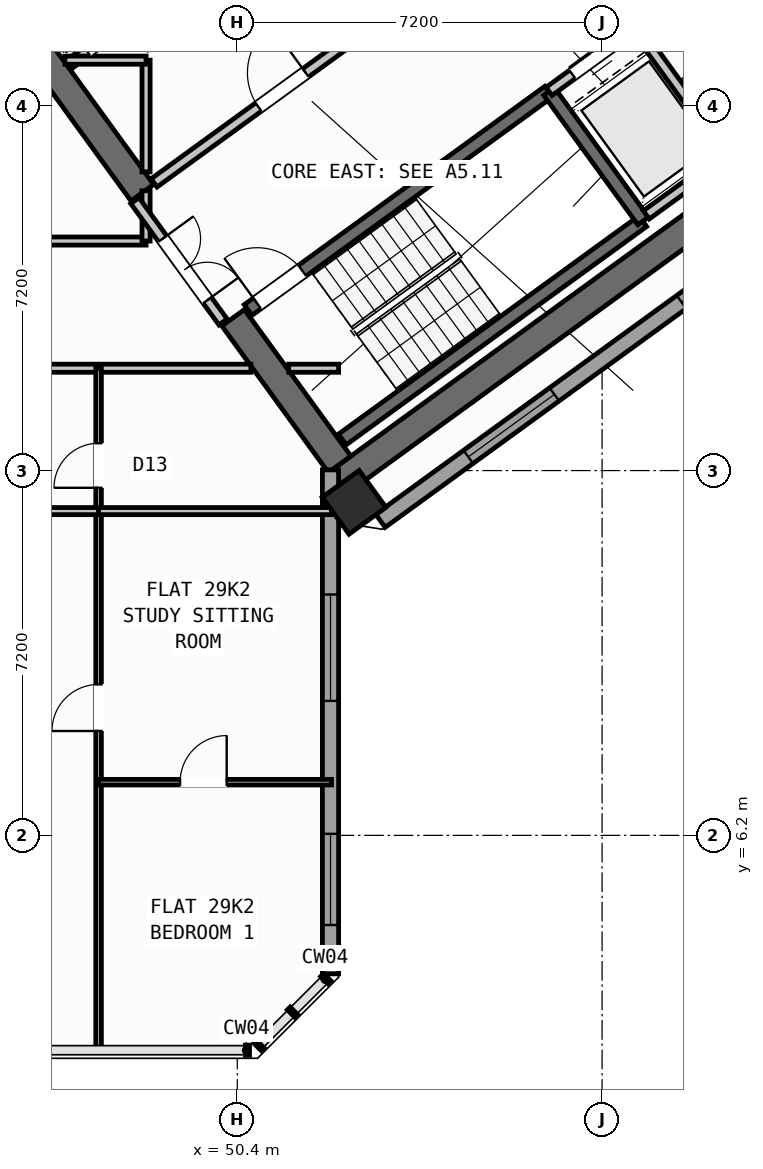
"""IFC4 building model, lengths in metres.
Left out: names, types, materials, properties, quantities, classifications, styles, units other than length and angle.
Written with IfcOpenShell. Run it as: python <this file> out.ifc"""

import sys

from ifc_helpers import new_model, si_unit, direction, frame, frame_2d, origin, origin_2d, place, context, subcontext, project, spatial, rectangle, hollow_rectangle, extrude, source, transform, mapped, element, fill, save


model = new_model("IFC4")
c1 = context("Model", 3, precision=1e-05, world=origin(), true_north=direction((0.0, 1.0)))
c2 = subcontext(c1, "Body", "Model", "MODEL_VIEW")
j1 = project(units=[si_unit("LENGTHUNIT", "METRE"), si_unit("PLANEANGLEUNIT", "RADIAN")], contexts=[c1])
p1 = place(None, origin())
s1 = spatial("IfcSite", under=j1, at=p1, CompositionType="ELEMENT")
p2 = place(p1, origin())
s2 = spatial("IfcBuilding", under=s1, at=p2, CompositionType="ELEMENT")
p3 = place(p2, frame((0.0, 0.0, 116.1)))
s3 = spatial("IfcBuildingStorey", under=s2, at=p3, CompositionType="ELEMENT", Elevation=116.1)
p4 = place(p3, frame((52.359, 13.14, 0.0), z_axis=(0.0, 0.0, 1.0), x_axis=(0.809014896919, 0.587788139183, 0.0)))
e1 = element("IfcWall", 1, at=p4, inside=s3, PredefinedType="SHEAR", context=c2, shape_type="SweptSolid", body=[
    extrude(rectangle(XDim=12.34, YDim=0.55, at=frame_2d((6.17, 0.0))), origin(), (0.0, 0.0, 1.0), 3.35),
])
p5 = place(p3, frame((52.42, 13.524, 0.0), z_axis=(0.0, 0.0, 1.0), x_axis=(-0.587802113096, 0.809004744015, 0.0)))
e2 = element("IfcWall", 2, at=p5, inside=s3, PredefinedType="SHEAR", context=c2, shape_type="SweptSolid", body=[
    extrude(rectangle(XDim=3.575, YDim=0.55, at=frame_2d((1.788, 0.0))), origin(), (0.0, 0.0, 1.0), 3.35),
])
p6 = place(p3, frame((48.526, 18.884, 0.0), z_axis=(0.0, 0.0, 1.0), x_axis=(-0.587764933797, 0.809031756236, 0.0)))
e3 = element("IfcWall", 3, at=p6, inside=s3, PredefinedType="SHEAR", context=c2, shape_type="SweptSolid", body=[
    extrude(rectangle(XDim=6.425, YDim=0.55, at=frame_2d((3.212, 0.0))), origin(), (0.0, 0.0, 1.0), 3.35),
])
m1 = source(origin(), c2, "Body", "SweptSolid", [
    extrude(hollow_rectangle(XDim=0.9, YDim=0.9, WallThickness=0.036, at=origin_2d()), origin(), (0.0, 0.0, 1.0), 3.6),
])
p7 = place(p3, frame((52.705, 12.773, 0.0), z_axis=(0.0, 0.0, 1.0), x_axis=(0.809016994375, 0.587785252292, 0.0)))
e4 = element("IfcColumn", 4, at=p7, inside=s3, PredefinedType="COLUMN", context=c2, shape_type="MappedRepresentation", body=[
    mapped(m1, transform((0.0, 0.0, 0.0), scale=1.0)),
])
p8 = place(p3, frame((67.454, 22.747, 0.0), z_axis=(0.0, 0.0, 1.0), x_axis=(-0.809021120468, -0.587779573171, 0.0)))
e5 = element("IfcWall", 5, at=p8, inside=s3, PredefinedType="STANDARD", context=c2, shape_type="SweptSolid", body=[
    extrude(rectangle(XDim=17.588, YDim=0.32, at=frame_2d((8.794, 0.0))), origin(), (0.0, 0.0, 1.0), 3.35),
])
p9 = place(p8, frame((1.624, 0.0, 0.0)))
e6 = element("IfcOpeningElement", 6, at=p9, cuts=e5, PredefinedType="OPENING", context=c2, shape_type="SweptSolid", body=[
    extrude(rectangle(XDim=1.05, YDim=2.15, at=frame_2d((0.525, 1.075))), frame((0.0, 0.17, 0.0), z_axis=(0.0, -1.0, 0.0), x_axis=(1.0, 0.0, 0.0)), (0.0, 0.0, 1.0), 0.34),
])
p10 = place(p8, frame((8.144, 0.0, 0.8)))
e7 = element("IfcOpeningElement", 7, at=p10, cuts=e5, PredefinedType="OPENING", context=c2, shape_type="SweptSolid", body=[
    extrude(rectangle(XDim=2.1, YDim=1.55, at=frame_2d((1.05, 0.775))), frame((0.0, 0.17, 0.0), z_axis=(0.0, -1.0, 0.0), x_axis=(1.0, 0.0, 0.0)), (0.0, 0.0, 1.0), 0.34),
])
p11 = place(p8, frame((13.344, 0.0, 0.8)))
e8 = element("IfcOpeningElement", 8, at=p11, cuts=e5, PredefinedType="OPENING", context=c2, shape_type="SweptSolid", body=[
    extrude(rectangle(XDim=2.1, YDim=1.55, at=frame_2d((1.05, 0.775))), frame((0.0, 0.17, 0.0), z_axis=(0.0, -1.0, 0.0), x_axis=(1.0, 0.0, 0.0)), (0.0, 0.0, 1.0), 0.34),
])
p12 = place(p3, frame((52.24, 13.414, 0.0), z_axis=(0.0, 0.0, 1.0), x_axis=(0.0, -1.0, 0.0)))
e9 = element("IfcWall", 9, at=p12, inside=s3, PredefinedType="STANDARD", context=c2, shape_type="SweptSolid", body=[
    extrude(rectangle(XDim=9.948, YDim=0.32, at=frame_2d((4.974, 0.0))), origin(), (0.0, 0.0, 1.0), 3.35),
])
p13 = place(p12, frame((2.46, 0.0, 0.8)))
e10 = element("IfcOpeningElement", 10, at=p13, cuts=e9, PredefinedType="OPENING", context=c2, shape_type="SweptSolid", body=[
    extrude(rectangle(XDim=2.1, YDim=1.55, at=frame_2d((1.05, 0.775))), frame((0.0, 0.17, 0.0), z_axis=(0.0, -1.0, 0.0), x_axis=(1.0, 0.0, 0.0)), (0.0, 0.0, 1.0), 0.34),
])
p14 = place(p12, frame((7.183, 0.0, 0.85)))
e11 = element("IfcOpeningElement", 11, at=p14, cuts=e9, PredefinedType="OPENING", context=c2, shape_type="SweptSolid", body=[
    extrude(rectangle(XDim=1.8, YDim=1.5, at=frame_2d((0.9, 0.75))), frame((0.0, 0.17, 0.0), z_axis=(0.0, -1.0, 0.0), x_axis=(1.0, 0.0, 0.0)), (0.0, 0.0, 1.0), 0.34),
])
p15 = place(p3, frame((52.472, 14.013, 0.0), z_axis=(0.0, 0.0, 1.0), x_axis=(0.809028366311, 0.587769599847, 0.0)))
e12 = element("IfcWall", 12, at=p15, inside=s3, PredefinedType="SHEAR", context=c2, shape_type="SweptSolid", body=[
    extrude(rectangle(XDim=7.33, YDim=0.26, at=frame_2d((3.665, 0.0))), origin(), (0.0, 0.0, 1.0), 3.35),
])
p16 = place(p3, frame((50.615, 16.57, 0.0), z_axis=(0.0, 0.0, 1.0), x_axis=(0.809028366311, 0.587769599847, 0.0)))
e13 = element("IfcWall", 13, at=p16, inside=s3, PredefinedType="SHEAR", context=c2, shape_type="SweptSolid", body=[
    extrude(rectangle(XDim=7.33, YDim=0.26, at=frame_2d((3.665, 0.0))), origin(), (0.0, 0.0, 1.0), 3.35),
])
p17 = place(p16, frame((0.22, 0.0, 0.0)))
e14 = element("IfcOpeningElement", 14, at=p17, cuts=e13, PredefinedType="OPENING", context=c2, shape_type="SweptSolid", body=[
    extrude(rectangle(XDim=1.1, YDim=2.1, at=frame_2d((0.55, 1.05))), frame((0.0, 0.14, 0.0), z_axis=(0.0, -1.0, 0.0), x_axis=(1.0, 0.0, 0.0)), (0.0, 0.0, 1.0), 0.28),
])
p18 = place(p3, frame((58.41, 18.327, 0.0), z_axis=(0.0, 0.0, 1.0), x_axis=(-0.58776738483, 0.809029975545, 0.0)))
e15 = element("IfcWall", 15, at=p18, inside=s3, PredefinedType="SHEAR", context=c2, shape_type="SweptSolid", body=[
    extrude(rectangle(XDim=3.16, YDim=0.26, at=frame_2d((1.58, 0.0))), origin(), (0.0, 0.0, 1.0), 3.35),
])
p19 = place(p3, frame((47.065, 21.407, 0.0), z_axis=(0.0, 0.0, 1.0), x_axis=(0.809032984992, 0.587763242466, 0.0)))
e16 = element("IfcWall", 16, at=p19, inside=s3, PredefinedType="STANDARD", context=c2, shape_type="SweptSolid", body=[
    extrude(rectangle(XDim=3.448, YDim=0.2, at=frame_2d((1.724, 0.0))), origin(), (0.0, 0.0, 1.0), 3.34),
])
p20 = place(p19, frame((0.458, 0.0, 0.0)))
e17 = element("IfcOpeningElement", 17, at=p20, cuts=e16, PredefinedType="OPENING", context=c2, shape_type="SweptSolid", body=[
    extrude(rectangle(XDim=1.3, YDim=2.2, at=frame_2d((0.65, 1.1))), frame((0.0, 0.11, 0.0), z_axis=(0.0, -1.0, 0.0), x_axis=(1.0, 0.0, 0.0)), (0.0, 0.0, 1.0), 0.22),
])
p21 = place(p3, frame((48.758, 19.077, 0.0), z_axis=(0.0, 0.0, 1.0), x_axis=(0.809005065155, 0.587801671104, 0.0)))
e18 = element("IfcWall", 18, at=p21, inside=s3, PredefinedType="STANDARD", context=c2, shape_type="SweptSolid", body=[
    extrude(rectangle(XDim=5.768, YDim=0.2, at=frame_2d((2.884, 0.0))), origin(), (0.0, 0.0, 1.0), 3.34),
])
p22 = place(p21, frame((2.548, 0.0, 0.0)))
e19 = element("IfcOpeningElement", 19, at=p22, cuts=e18, PredefinedType="OPENING", context=c2, shape_type="SweptSolid", body=[
    extrude(rectangle(XDim=1.15, YDim=2.1, at=frame_2d((0.575, 1.05))), frame((0.0, 0.11, 0.0), z_axis=(0.0, -1.0, 0.0), x_axis=(1.0, 0.0, 0.0)), (0.0, 0.0, 1.0), 0.22),
])
p23 = place(p3, frame((56.553, 20.884, 0.0), z_axis=(0.0, 0.0, 1.0), x_axis=(0.809023564264, 0.58777620951, 0.0)))
e20 = element("IfcWall", 20, at=p23, inside=s3, PredefinedType="STANDARD", context=c2, shape_type="SweptSolid", body=[
    extrude(rectangle(XDim=3.818, YDim=0.2, at=frame_2d((1.909, 0.0))), origin(), (0.0, 0.0, 1.0), 3.34),
])
p24 = place(p23, frame((0.57, 0.0, 0.0)))
e21 = element("IfcOpeningElement", 21, at=p24, cuts=e20, PredefinedType="OPENING", context=c2, shape_type="SweptSolid", body=[
    extrude(rectangle(XDim=1.1, YDim=2.15, at=frame_2d((0.55, 1.075))), frame((0.0, 0.11, 0.0), z_axis=(0.0, -1.0, 0.0), x_axis=(1.0, 0.0, 0.0)), (0.0, 0.0, 1.0), 0.22),
])
p25 = place(p23, frame((2.65, 0.0, 0.0)))
e22 = element("IfcOpeningElement", 22, at=p25, cuts=e20, PredefinedType="OPENING", context=c2, shape_type="SweptSolid", body=[
    extrude(rectangle(XDim=0.86, YDim=2.05, at=frame_2d((0.43, 1.025))), frame((0.0, 0.11, 0.0), z_axis=(0.0, -1.0, 0.0), x_axis=(1.0, 0.0, 0.0)), (0.0, 0.0, 1.0), 0.22),
])
p26 = place(p3, frame((60.067, 19.655, 0.0), z_axis=(0.0, 0.0, 1.0), x_axis=(-0.587800520745, 0.809005900975, 0.0)))
e23 = element("IfcWall", 23, at=p26, inside=s3, PredefinedType="STANDARD", context=c2, shape_type="SweptSolid", body=[
    extrude(rectangle(XDim=2.66, YDim=0.2, at=frame_2d((1.33, 0.0))), origin(), (0.0, 0.0, 1.0), 3.34),
])
p27 = place(p3, frame((58.472, 18.447, 0.0), z_axis=(0.0, 0.0, 1.0), x_axis=(0.809018631237, 0.587782999339, 0.0)))
e24 = element("IfcWall", 24, at=p27, inside=s3, PredefinedType="STANDARD", context=c2, shape_type="SweptSolid", body=[
    extrude(rectangle(XDim=3.698, YDim=0.2, at=frame_2d((1.849, 0.0))), origin(), (0.0, 0.0, 1.0), 3.34),
])
p28 = place(p3, frame((35.237, 15.42, 0.0), z_axis=(0.0, 0.0, 1.0), x_axis=(1.0, 0.0, 0.0)))
e25 = element("IfcWall", 25, at=p28, inside=s3, PredefinedType="PARTITIONING", context=c2, shape_type="SweptSolid", body=[
    extrude(rectangle(XDim=15.432, YDim=0.16, at=frame_2d((7.716, 0.0))), origin(), (0.0, 0.0, 1.0), 3.34),
])
p29 = place(p28, frame((0.674, 0.0, 0.0)))
e26 = element("IfcOpeningElement", 26, at=p29, cuts=e25, PredefinedType="OPENING", context=c2, shape_type="SweptSolid", body=[
    extrude(rectangle(XDim=1.0, YDim=2.1, at=frame_2d((0.5, 1.05))), frame((0.0, 0.09, 0.0), z_axis=(0.0, -1.0, 0.0), x_axis=(1.0, 0.0, 0.0)), (0.0, 0.0, 1.0), 0.18),
])
p30 = place(p28, frame((9.094, 0.0, 0.0)))
e27 = element("IfcOpeningElement", 27, at=p30, cuts=e25, PredefinedType="OPENING", context=c2, shape_type="SweptSolid", body=[
    extrude(rectangle(XDim=1.0, YDim=2.1, at=frame_2d((0.5, 1.05))), frame((0.0, 0.09, 0.0), z_axis=(0.0, -1.0, 0.0), x_axis=(1.0, 0.0, 0.0)), (0.0, 0.0, 1.0), 0.18),
])
p31 = place(p3, frame((51.416, 15.42, 0.0), z_axis=(0.0, 0.0, 1.0), x_axis=(1.0, 0.0, 0.0)))
e28 = element("IfcWall", 28, at=p31, inside=s3, PredefinedType="PARTITIONING", context=c2, shape_type="SweptSolid", body=[
    extrude(rectangle(XDim=0.984, YDim=0.16, at=frame_2d((0.492, 0.0))), origin(), (0.0, 0.0, 1.0), 3.34),
])
p32 = place(p3, frame((38.65, 17.93, 0.0), z_axis=(0.0, 0.0, 1.0), x_axis=(1.0, 0.0, 0.0)))
e29 = element("IfcWall", 29, at=p32, inside=s3, PredefinedType="PARTITIONING", context=c2, shape_type="SweptSolid", body=[
    extrude(rectangle(XDim=9.95, YDim=0.16, at=frame_2d((4.975, 0.0))), origin(), (0.0, 0.0, 1.0), 3.34),
])
p33 = place(p32, frame((4.475, 0.0, 0.0)))
e30 = element("IfcOpeningElement", 30, at=p33, cuts=e29, PredefinedType="OPENING", context=c2, shape_type="SweptSolid", body=[
    extrude(rectangle(XDim=1.0, YDim=2.1, at=frame_2d((0.5, 1.05))), frame((0.0, 0.09, 0.0), z_axis=(0.0, -1.0, 0.0), x_axis=(1.0, 0.0, 0.0)), (0.0, 0.0, 1.0), 0.18),
])
p34 = place(p3, frame((48.6, 17.93, 0.0), z_axis=(0.0, 0.0, 1.0), x_axis=(0.0, 1.0, 0.0)))
e31 = element("IfcWall", 31, at=p34, inside=s3, PredefinedType="PARTITIONING", context=c2, shape_type="SweptSolid", body=[
    extrude(rectangle(XDim=0.993, YDim=0.16, at=frame_2d((0.496, 0.0))), origin(), (0.0, 0.0, 1.0), 3.34),
])
p35 = place(p3, frame((48.6, 19.295, 0.0), z_axis=(0.0, 0.0, 1.0), x_axis=(0.0, 1.0, 0.0)))
e32 = element("IfcWall", 32, at=p35, inside=s3, PredefinedType="PARTITIONING", context=c2, shape_type="SweptSolid", body=[
    extrude(rectangle(XDim=2.205, YDim=0.16, at=frame_2d((1.103, 0.0))), origin(), (0.0, 0.0, 1.0), 3.34),
])
p36 = place(p3, frame((46.998, 21.5, 0.0), z_axis=(0.0, 0.0, 1.0), x_axis=(1.0, 0.0, 0.0)))
e33 = element("IfcWall", 33, at=p36, inside=s3, PredefinedType="PARTITIONING", context=c2, shape_type="SweptSolid", body=[
    extrude(rectangle(XDim=1.602, YDim=0.16, at=frame_2d((0.801, 0.0))), origin(), (0.0, 0.0, 1.0), 3.34),
])
p37 = place(p3, frame((50.119, 16.333, 0.0), z_axis=(0.0, 0.0, 1.0), x_axis=(-0.587749856981, 0.809042709391, 0.0)))
e34 = element("IfcWall", 34, at=p37, inside=s3, PredefinedType="STANDARD", context=c2, shape_type="SweptSolid", body=[
    extrude(rectangle(XDim=2.96, YDim=0.2, at=frame_2d((1.48, 0.0))), origin(), (0.0, 0.0, 1.0), 3.34),
])
p38 = place(p37, frame((0.53, 0.0, 0.0)))
e35 = element("IfcOpeningElement", 35, at=p38, cuts=e34, PredefinedType="OPENING", context=c2, shape_type="SweptSolid", body=[
    extrude(rectangle(XDim=1.5, YDim=2.15, at=frame_2d((0.75, 1.075))), frame((0.0, 0.11, 0.0), z_axis=(0.0, -1.0, 0.0), x_axis=(1.0, 0.0, 0.0)), (0.0, 0.0, 1.0), 0.22),
])
p39 = place(p3, frame((47.663, 1.96, 0.0), z_axis=(0.0, 0.0, 1.0), x_axis=(0.0, 1.0, 0.0)))
e36 = element("IfcWall", 36, at=p39, inside=s3, PredefinedType="PARTITIONING", context=c2, shape_type="SweptSolid", body=[
    extrude(rectangle(XDim=13.46, YDim=0.11, at=frame_2d((6.73, 0.0))), origin(), (0.0, 0.0, 1.0), 3.34),
])
p40 = place(p39, frame((6.3, 0.0, 0.0)))
e37 = element("IfcOpeningElement", 37, at=p40, cuts=e36, PredefinedType="OPENING", context=c2, shape_type="SweptSolid", body=[
    extrude(rectangle(XDim=0.92, YDim=2.08, at=frame_2d((0.46, 1.04))), frame((0.0, 0.065, 0.0), z_axis=(0.0, -1.0, 0.0), x_axis=(1.0, 0.0, 0.0)), (0.0, 0.0, 1.0), 0.13),
])
p41 = place(p39, frame((11.1, 0.0, 0.0)))
e38 = element("IfcOpeningElement", 38, at=p41, cuts=e36, PredefinedType="OPENING", context=c2, shape_type="SweptSolid", body=[
    extrude(rectangle(XDim=0.88, YDim=2.08, at=frame_2d((0.44, 1.04))), frame((0.0, 0.065, 0.0), z_axis=(0.0, -1.0, 0.0), x_axis=(1.0, 0.0, 0.0)), (0.0, 0.0, 1.0), 0.13),
])
p42 = place(p3, frame((41.95, 12.6, 0.0), z_axis=(0.0, 0.0, 1.0), x_axis=(1.0, 0.0, 0.0)))
e39 = element("IfcWall", 39, at=p42, inside=s3, PredefinedType="PLUMBINGWALL", context=c2, shape_type="SweptSolid", body=[
    extrude(rectangle(XDim=5.713, YDim=0.14, at=frame_2d((2.856, 0.0))), origin(), (0.0, 0.0, 1.0), 2.525),
])
p43 = place(p42, frame((2.396, 0.0, 0.0)))
e40 = element("IfcOpeningElement", 40, at=p43, cuts=e39, PredefinedType="OPENING", context=c2, shape_type="SweptSolid", body=[
    extrude(rectangle(XDim=0.92, YDim=2.08, at=frame_2d((0.46, 1.04))), frame((0.0, 0.08, 0.0), z_axis=(0.0, -1.0, 0.0), x_axis=(1.0, 0.0, 0.0)), (0.0, 0.0, 1.0), 0.16),
])
p44 = place(p3, frame((47.663, 12.6, 0.0), z_axis=(0.0, 0.0, 1.0), x_axis=(1.0, 0.0, 0.0)))
e41 = element("IfcWall", 41, at=p44, inside=s3, PredefinedType="PLUMBINGWALL", context=c2, shape_type="SweptSolid", body=[
    extrude(rectangle(XDim=4.597, YDim=0.14, at=frame_2d((2.298, 0.0))), origin(), (0.0, 0.0, 1.0), 2.525),
])
p45 = place(p3, frame((47.663, 7.25, 0.0), z_axis=(0.0, 0.0, 1.0), x_axis=(1.0, 0.0, 0.0)))
e42 = element("IfcWall", 42, at=p45, inside=s3, PredefinedType="PARTITIONING", context=c2, shape_type="SweptSolid", body=[
    extrude(rectangle(XDim=4.597, YDim=0.11, at=frame_2d((2.298, 0.0))), origin(), (0.0, 0.0, 1.0), 3.34),
])
p46 = place(p45, frame((1.608, 0.0, 0.0)))
e43 = element("IfcOpeningElement", 43, at=p46, cuts=e42, PredefinedType="OPENING", context=c2, shape_type="SweptSolid", body=[
    extrude(rectangle(XDim=0.92, YDim=2.08, at=frame_2d((0.46, 1.04))), frame((0.0, 0.065, 0.0), z_axis=(0.0, -1.0, 0.0), x_axis=(1.0, 0.0, 0.0)), (0.0, 0.0, 1.0), 0.13),
])
m2 = source(origin(), c2, "Body", "SweptSolid", [
    extrude(rectangle(XDim=2.1, YDim=1.55, at=frame_2d((1.05, 0.775))), frame((0.0, 0.03, 0.0), z_axis=(0.0, -1.0, 0.0), x_axis=(1.0, 0.0, 0.0)), (0.0, 0.0, 1.0), 0.06),
])
p47 = place(p10, origin())
e44 = element("IfcWindow", 44, at=p47, inside=s3, PartitioningType="SINGLE_PANEL", PredefinedType="WINDOW", context=c2, shape_type="MappedRepresentation", body=[
    mapped(m2, transform((0.0, 0.0, 0.0), scale=1.0)),
])
fill(e7, e44)
p48 = place(p11, origin())
e45 = element("IfcWindow", 45, at=p48, inside=s3, PartitioningType="SINGLE_PANEL", PredefinedType="WINDOW", context=c2, shape_type="MappedRepresentation", body=[
    mapped(m2, transform((0.0, 0.0, 0.0), scale=1.0)),
])
fill(e8, e45)
p49 = place(p13, origin())
e46 = element("IfcWindow", 46, at=p49, inside=s3, PartitioningType="SINGLE_PANEL", PredefinedType="WINDOW", context=c2, shape_type="MappedRepresentation", body=[
    mapped(m2, transform((0.0, 0.0, 0.0), scale=1.0)),
])
fill(e10, e46)
m3 = source(origin(), c2, "Body", "SweptSolid", [
    extrude(rectangle(XDim=1.8, YDim=1.5, at=frame_2d((0.9, 0.75))), frame((0.0, 0.03, 0.0), z_axis=(0.0, -1.0, 0.0), x_axis=(1.0, 0.0, 0.0)), (0.0, 0.0, 1.0), 0.06),
])
p50 = place(p14, origin())
e47 = element("IfcWindow", 47, at=p50, inside=s3, PartitioningType="SINGLE_PANEL", PredefinedType="WINDOW", context=c2, shape_type="MappedRepresentation", body=[
    mapped(m3, transform((0.0, 0.0, 0.0), scale=1.0)),
])
fill(e11, e47)
m4 = source(origin(), c2, "Body", "SweptSolid", [
    extrude(rectangle(XDim=1.1, YDim=2.1, at=frame_2d((0.55, 1.05))), frame((0.0, 0.025, 0.0), z_axis=(0.0, -1.0, 0.0), x_axis=(1.0, 0.0, 0.0)), (0.0, 0.0, 1.0), 0.05),
])
p51 = place(p17, origin())
e48 = element("IfcDoor", 48, at=p51, inside=s3, OperationType="SINGLE_SWING_LEFT", PredefinedType="DOOR", context=c2, shape_type="MappedRepresentation", body=[
    mapped(m4, transform((0.0, 0.0, 0.0), scale=1.0)),
])
fill(e14, e48)
m5 = source(origin(), c2, "Body", "SweptSolid", [
    extrude(rectangle(XDim=1.15, YDim=2.1, at=frame_2d((0.575, 1.05))), frame((0.0, 0.025, 0.0), z_axis=(0.0, -1.0, 0.0), x_axis=(1.0, 0.0, 0.0)), (0.0, 0.0, 1.0), 0.05),
])
p52 = place(p22, origin())
e49 = element("IfcDoor", 49, at=p52, inside=s3, OperationType="SINGLE_SWING_RIGHT", PredefinedType="DOOR", context=c2, shape_type="MappedRepresentation", body=[
    mapped(m5, transform((0.0, 0.0, 0.0), scale=1.0)),
])
fill(e19, e49)
m6 = source(origin(), c2, "Body", "SweptSolid", [
    extrude(rectangle(XDim=1.3, YDim=2.2, at=frame_2d((0.65, 1.1))), frame((0.0, 0.025, 0.0), z_axis=(0.0, -1.0, 0.0), x_axis=(1.0, 0.0, 0.0)), (0.0, 0.0, 1.0), 0.05),
])
p53 = place(p20, origin())
e50 = element("IfcDoor", 50, at=p53, inside=s3, OperationType="DOUBLE_DOOR_SLIDING", PredefinedType="DOOR", context=c2, shape_type="MappedRepresentation", body=[
    mapped(m6, transform((0.0, 0.0, 0.0), scale=1.0)),
])
fill(e17, e50)
m7 = source(origin(), c2, "Body", "SweptSolid", [
    extrude(rectangle(XDim=1.1, YDim=2.15, at=frame_2d((0.55, 1.075))), frame((0.0, 0.025, 0.0), z_axis=(0.0, -1.0, 0.0), x_axis=(1.0, 0.0, 0.0)), (0.0, 0.0, 1.0), 0.05),
])
p54 = place(p24, origin())
e51 = element("IfcDoor", 51, at=p54, inside=s3, OperationType="DOUBLE_DOOR_SLIDING", PredefinedType="DOOR", context=c2, shape_type="MappedRepresentation", body=[
    mapped(m7, transform((0.0, 0.0, 0.0), scale=1.0)),
])
fill(e21, e51)
m8 = source(origin(), c2, "Body", "SweptSolid", [
    extrude(rectangle(XDim=1.5, YDim=2.15, at=frame_2d((0.75, 1.075))), frame((0.0, 0.025, 0.0), z_axis=(0.0, -1.0, 0.0), x_axis=(1.0, 0.0, 0.0)), (0.0, 0.0, 1.0), 0.05),
])
p55 = place(p38, frame((1.5, 0.0, 0.0), z_axis=(0.0, 0.0, 1.0), x_axis=(-1.0, 0.0, 0.0)))
e52 = element("IfcDoor", 52, at=p55, inside=s3, OperationType="DOUBLE_DOOR_SINGLE_SWING", PredefinedType="DOOR", context=c2, shape_type="MappedRepresentation", body=[
    mapped(m8, transform((0.0, 0.0, 0.0), scale=1.0)),
])
fill(e35, e52)
m9 = source(origin(), c2, "Body", "SweptSolid", [
    extrude(rectangle(XDim=0.92, YDim=2.08, at=frame_2d((0.46, 1.04))), frame((0.0, 0.025, 0.0), z_axis=(0.0, -1.0, 0.0), x_axis=(1.0, 0.0, 0.0)), (0.0, 0.0, 1.0), 0.05),
])
p56 = place(p40, origin())
e53 = element("IfcDoor", 53, at=p56, inside=s3, OperationType="SINGLE_SWING_LEFT", PredefinedType="DOOR", context=c2, shape_type="MappedRepresentation", body=[
    mapped(m9, transform((0.0, 0.0, 0.0), scale=1.0)),
])
fill(e37, e53)
p57 = place(p46, origin())
e54 = element("IfcDoor", 54, at=p57, inside=s3, OperationType="SINGLE_SWING_RIGHT", PredefinedType="DOOR", context=c2, shape_type="MappedRepresentation", body=[
    mapped(m9, transform((0.0, 0.0, 0.0), scale=1.0)),
])
fill(e43, e54)
m10 = source(origin(), c2, "Body", "SweptSolid", [
    extrude(rectangle(XDim=0.88, YDim=2.08, at=frame_2d((0.44, 1.04))), frame((0.0, 0.025, 0.0), z_axis=(0.0, -1.0, 0.0), x_axis=(1.0, 0.0, 0.0)), (0.0, 0.0, 1.0), 0.05),
])
p58 = place(p41, origin())
e55 = element("IfcDoor", 55, at=p58, inside=s3, OperationType="SINGLE_SWING_LEFT", PredefinedType="DOOR", context=c2, shape_type="MappedRepresentation", body=[
    mapped(m10, transform((0.0, 0.0, 0.0), scale=1.0)),
])
fill(e38, e55)
save(model, sys.argv[1])
